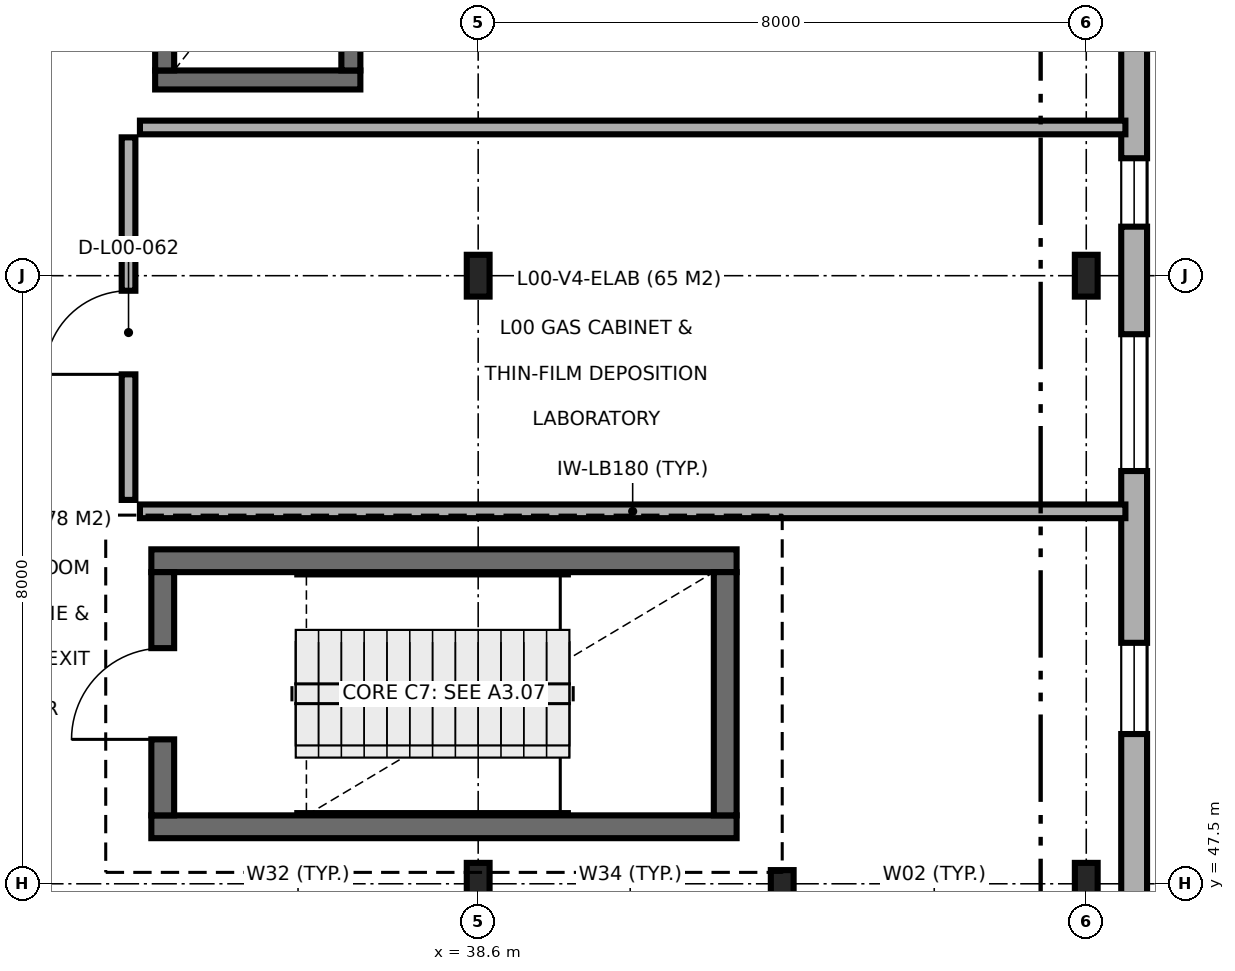
"""IFC4 building model, lengths in metres.
Left out: names, types, materials, properties, quantities, classifications, styles, units other than length and angle.
Written with IfcOpenShell. Run it as: python <this file> out.ifc"""

import sys

from ifc_helpers import new_model, si_unit, direction, frame, frame_2d, origin, origin_2d, place, context, subcontext, project, spatial, rectangle, i_section, extrude, element, fill, save


model = new_model("IFC4")
c1 = context("Model", 3, precision=1e-05, world=origin(), true_north=direction((0.0, 1.0)))
c2 = subcontext(c1, "Body", "Model", "MODEL_VIEW")
j1 = project(units=[si_unit("LENGTHUNIT", "METRE"), si_unit("PLANEANGLEUNIT", "RADIAN")], contexts=[c1])
p1 = place(None, origin())
s1 = spatial("IfcSite", under=j1, at=p1, CompositionType="ELEMENT")
p2 = place(p1, origin())
s2 = spatial("IfcBuilding", under=s1, at=p2, CompositionType="ELEMENT")
p3 = place(p2, origin())
s3 = spatial("IfcBuildingStorey", under=s2, at=p3, CompositionType="ELEMENT", Elevation=0.0)
for number, where, z_axis, x_axis in (
    (1, (38.6, 47.5, 0.0), (0.0, 0.0, 1.0), (1.0, 0.0, 0.0)),
    (2, (38.6, 55.5, 0.0), (0.0, 0.0, 1.0), (1.0, 0.0, 0.0)),
):
    element("IfcColumn", number, at=place(p3, frame(where, z_axis=z_axis, x_axis=x_axis)), inside=s3, PredefinedType="COLUMN", context=c2, shape_type="SweptSolid", body=[
        extrude(i_section(OverallWidth=0.3, OverallDepth=0.55, WebThickness=0.015, FlangeThickness=0.029, FilletRadius=0.027, at=origin_2d()), origin(), (0.0, 0.0, 1.0), 4.8),
    ])
p4 = place(p3, frame((42.6, 47.5, 0.0), z_axis=(0.0, 0.0, 1.0), x_axis=(1.0, 0.0, 0.0)))
e3 = element("IfcColumn", 3, at=p4, inside=s3, PredefinedType="COLUMN", context=c2, shape_type="SweptSolid", body=[
    extrude(i_section(OverallWidth=0.3, OverallDepth=0.36, WebThickness=0.012, FlangeThickness=0.022, FilletRadius=0.027, at=origin_2d()), origin(), (0.0, 0.0, 1.0), 4.8),
])
for number, where, z_axis, x_axis in (
    (4, (46.6, 47.5, 0.0), (0.0, 0.0, 1.0), (1.0, 0.0, 0.0)),
    (5, (46.6, 55.5, 0.0), (0.0, 0.0, 1.0), (1.0, 0.0, 0.0)),
):
    element("IfcColumn", number, at=place(p3, frame(where, z_axis=z_axis, x_axis=x_axis)), inside=s3, PredefinedType="COLUMN", context=c2, shape_type="SweptSolid", body=[
        extrude(i_section(OverallWidth=0.3, OverallDepth=0.55, WebThickness=0.015, FlangeThickness=0.029, FilletRadius=0.027, at=origin_2d()), origin(), (0.0, 0.0, 1.0), 4.8),
    ])
for number, where, z_axis, x_axis in (
    (6, (34.3, 48.25, 0.0), (0.0, 0.0, 1.0), (1.0, 0.0, 0.0)),
    (7, (42.0, 51.75, 0.0), (0.0, 0.0, 1.0), (-1.0, 0.0, 0.0)),
):
    element("IfcWall", number, at=place(p3, frame(where, z_axis=z_axis, x_axis=x_axis)), inside=s3, PredefinedType="SHEAR", context=c2, shape_type="SweptSolid", body=[
        extrude(rectangle(XDim=7.7, YDim=0.3, at=frame_2d((3.85, 0.0))), origin(), (0.0, 0.0, 1.0), 4.8),
    ])
p5 = place(p3, frame((34.45, 51.6, 0.0), z_axis=(0.0, 0.0, 1.0), x_axis=(0.0, -1.0, 0.0)))
e8 = element("IfcWall", 8, at=p5, inside=s3, PredefinedType="SHEAR", context=c2, shape_type="SweptSolid", body=[
    extrude(rectangle(XDim=3.2, YDim=0.3, at=frame_2d((1.6, 0.0))), origin(), (0.0, 0.0, 1.0), 4.8),
])
p6 = place(p5, frame((1.0, 0.0, 0.0)))
e9 = element("IfcOpeningElement", 9, at=p6, cuts=e8, PredefinedType="OPENING", context=c2, shape_type="SweptSolid", body=[
    extrude(rectangle(XDim=1.2, YDim=2.15, at=frame_2d((0.6, 1.075))), frame((0.0, 0.16, 0.0), z_axis=(0.0, -1.0, 0.0), x_axis=(1.0, 0.0, 0.0)), (0.0, 0.0, 1.0), 0.32),
])
p7 = place(p3, frame((41.85, 48.4, 0.0), z_axis=(0.0, 0.0, 1.0), x_axis=(0.0, 1.0, 0.0)))
e10 = element("IfcWall", 10, at=p7, inside=s3, PredefinedType="SHEAR", context=c2, shape_type="SweptSolid", body=[
    extrude(rectangle(XDim=3.2, YDim=0.3, at=frame_2d((1.6, 0.0))), origin(), (0.0, 0.0, 1.0), 4.8),
])
p8 = place(p3, frame((34.35, 58.075, 0.0), z_axis=(0.0, 0.0, 1.0), x_axis=(1.0, 0.0, 0.0)))
e11 = element("IfcWall", 11, at=p8, inside=s3, PredefinedType="SHEAR", context=c2, shape_type="SweptSolid", body=[
    extrude(rectangle(XDim=2.7, YDim=0.25, at=frame_2d((1.35, 0.0))), origin(), (0.0, 0.0, 1.0), 4.8),
])
p9 = place(p3, frame((34.475, 61.0, 0.0), z_axis=(0.0, 0.0, 1.0), x_axis=(0.0, -1.0, 0.0)))
e12 = element("IfcWall", 12, at=p9, inside=s3, PredefinedType="SHEAR", context=c2, shape_type="SweptSolid", body=[
    extrude(rectangle(XDim=2.8, YDim=0.25, at=frame_2d((1.4, 0.0))), origin(), (0.0, 0.0, 1.0), 4.8),
])
p10 = place(p9, frame((0.85, 0.0, 0.0)))
e13 = element("IfcOpeningElement", 13, at=p10, cuts=e12, PredefinedType="OPENING", context=c2, shape_type="SweptSolid", body=[
    extrude(rectangle(XDim=1.1, YDim=2.15, at=frame_2d((0.55, 1.075))), frame((0.0, 0.135, 0.0), z_axis=(0.0, -1.0, 0.0), x_axis=(1.0, 0.0, 0.0)), (0.0, 0.0, 1.0), 0.27),
])
p11 = place(p3, frame((36.925, 58.2, 0.0), z_axis=(0.0, 0.0, 1.0), x_axis=(0.0, 1.0, 0.0)))
e14 = element("IfcWall", 14, at=p11, inside=s3, PredefinedType="SHEAR", context=c2, shape_type="SweptSolid", body=[
    extrude(rectangle(XDim=2.8, YDim=0.25, at=frame_2d((1.4, 0.0))), origin(), (0.0, 0.0, 1.0), 4.8),
])
p12 = place(p3, frame((47.23, 47.222, 0.0), z_axis=(0.0, 0.0, 1.0), x_axis=(0.0, 1.0, 0.0)))
e15 = element("IfcWall", 15, at=p12, inside=s3, PredefinedType="SOLIDWALL", context=c2, shape_type="SweptSolid", body=[
    extrude(rectangle(XDim=27.278, YDim=0.34, at=frame_2d((13.639, 0.0))), origin(), (0.0, 0.0, 1.0), 4.55),
])
p13 = place(p12, frame((2.248, 0.0, 0.9)))
e16 = element("IfcOpeningElement", 16, at=p13, cuts=e15, PredefinedType="OPENING", context=c2, shape_type="SweptSolid", body=[
    extrude(rectangle(XDim=1.2, YDim=1.8, at=frame_2d((0.6, 0.9))), frame((0.0, 0.18, 0.0), z_axis=(0.0, -1.0, 0.0), x_axis=(1.0, 0.0, 0.0)), (0.0, 0.0, 1.0), 0.36),
])
p14 = place(p12, frame((5.708, 0.0, 0.9)))
e17 = element("IfcOpeningElement", 17, at=p14, cuts=e15, PredefinedType="OPENING", context=c2, shape_type="SweptSolid", body=[
    extrude(rectangle(XDim=1.8, YDim=1.8, at=frame_2d((0.9, 0.9))), frame((0.0, 0.18, 0.0), z_axis=(0.0, -1.0, 0.0), x_axis=(1.0, 0.0, 0.0)), (0.0, 0.0, 1.0), 0.36),
])
p15 = place(p12, frame((8.923, 0.0, 0.9)))
e18 = element("IfcOpeningElement", 18, at=p15, cuts=e15, PredefinedType="OPENING", context=c2, shape_type="SweptSolid", body=[
    extrude(rectangle(XDim=0.9, YDim=1.8, at=frame_2d((0.45, 0.9))), frame((0.0, 0.18, 0.0), z_axis=(0.0, -1.0, 0.0), x_axis=(1.0, 0.0, 0.0)), (0.0, 0.0, 1.0), 0.36),
])
p16 = place(p12, frame((14.758, 0.0, 0.9)))
e19 = element("IfcOpeningElement", 19, at=p16, cuts=e15, PredefinedType="OPENING", context=c2, shape_type="SweptSolid", body=[
    extrude(rectangle(XDim=0.9, YDim=1.8, at=frame_2d((0.45, 0.9))), frame((0.0, 0.18, 0.0), z_axis=(0.0, -1.0, 0.0), x_axis=(1.0, 0.0, 0.0)), (0.0, 0.0, 1.0), 0.36),
])
p17 = place(p12, frame((20.333, 0.0, 0.9)))
e20 = element("IfcOpeningElement", 20, at=p17, cuts=e15, PredefinedType="OPENING", context=c2, shape_type="SweptSolid", body=[
    extrude(rectangle(XDim=1.5, YDim=2.1, at=frame_2d((0.75, 1.05))), frame((0.0, 0.18, 0.0), z_axis=(0.0, -1.0, 0.0), x_axis=(1.0, 0.0, 0.0)), (0.0, 0.0, 1.0), 0.36),
])
p18 = place(p12, frame((25.128, 0.0, 0.9)))
e21 = element("IfcOpeningElement", 21, at=p18, cuts=e15, PredefinedType="OPENING", context=c2, shape_type="SweptSolid", body=[
    extrude(rectangle(XDim=1.2, YDim=1.8, at=frame_2d((0.6, 0.9))), frame((0.0, 0.18, 0.0), z_axis=(0.0, -1.0, 0.0), x_axis=(1.0, 0.0, 0.0)), (0.0, 0.0, 1.0), 0.36),
])
for number, where, z_axis, x_axis in (
    (22, (34.15, 52.4, 0.0), (0.0, 0.0, 1.0), (1.0, 0.0, 0.0)),
    (23, (34.15, 57.45, 0.0), (0.0, 0.0, 1.0), (1.0, 0.0, 0.0)),
):
    element("IfcWall", number, at=place(p3, frame(where, z_axis=z_axis, x_axis=x_axis)), inside=s3, PredefinedType="PARTITIONING", context=c2, shape_type="SweptSolid", body=[
        extrude(rectangle(XDim=12.965, YDim=0.18, at=frame_2d((6.482, 0.0))), origin(), (0.0, 0.0, 1.0), 4.55),
    ])
p19 = place(p3, frame((34.0, 52.55, 0.0), z_axis=(0.0, 0.0, 1.0), x_axis=(0.0, 1.0, 0.0)))
e24 = element("IfcWall", 24, at=p19, inside=s3, PredefinedType="PARTITIONING", context=c2, shape_type="SweptSolid", body=[
    extrude(rectangle(XDim=4.77, YDim=0.18, at=frame_2d((2.385, 0.0))), origin(), (0.0, 0.0, 1.0), 4.55),
])
p20 = place(p19, frame((1.652, 0.0, 0.0)))
e25 = element("IfcOpeningElement", 25, at=p20, cuts=e24, PredefinedType="OPENING", context=c2, shape_type="SweptSolid", body=[
    extrude(rectangle(XDim=1.1, YDim=2.15, at=frame_2d((0.55, 1.075))), frame((0.0, 0.1, 0.0), z_axis=(0.0, -1.0, 0.0), x_axis=(1.0, 0.0, 0.0)), (0.0, 0.0, 1.0), 0.2),
])
p21 = place(p6, frame((1.2, 0.0, 0.0), z_axis=(0.0, 0.0, 1.0), x_axis=(-1.0, 0.0, 0.0)))
e26 = element("IfcDoor", 26, at=p21, inside=s3, OperationType="SINGLE_SWING_RIGHT", PredefinedType="DOOR", context=c2, shape_type="SweptSolid", body=[
    extrude(rectangle(XDim=1.2, YDim=2.15, at=frame_2d((0.6, 1.075))), frame((0.0, 0.025, 0.0), z_axis=(0.0, -1.0, 0.0), x_axis=(1.0, 0.0, 0.0)), (0.0, 0.0, 1.0), 0.05),
])
fill(e9, e26)
p22 = place(p13, origin())
e27 = element("IfcWindow", 27, at=p22, inside=s3, PartitioningType="SINGLE_PANEL", PredefinedType="WINDOW", context=c2, shape_type="SweptSolid", body=[
    extrude(rectangle(XDim=1.2, YDim=1.8, at=frame_2d((0.6, 0.9))), frame((0.0, 0.03, 0.0), z_axis=(0.0, -1.0, 0.0), x_axis=(1.0, 0.0, 0.0)), (0.0, 0.0, 1.0), 0.06),
])
fill(e16, e27)
p23 = place(p14, origin())
e28 = element("IfcWindow", 28, at=p23, inside=s3, PartitioningType="SINGLE_PANEL", PredefinedType="WINDOW", context=c2, shape_type="SweptSolid", body=[
    extrude(rectangle(XDim=1.8, YDim=1.8, at=frame_2d((0.9, 0.9))), frame((0.0, 0.03, 0.0), z_axis=(0.0, -1.0, 0.0), x_axis=(1.0, 0.0, 0.0)), (0.0, 0.0, 1.0), 0.06),
])
fill(e17, e28)
p24 = place(p15, origin())
e29 = element("IfcWindow", 29, at=p24, inside=s3, PartitioningType="SINGLE_PANEL", PredefinedType="WINDOW", context=c2, shape_type="SweptSolid", body=[
    extrude(rectangle(XDim=0.9, YDim=1.8, at=frame_2d((0.45, 0.9))), frame((0.0, 0.03, 0.0), z_axis=(0.0, -1.0, 0.0), x_axis=(1.0, 0.0, 0.0)), (0.0, 0.0, 1.0), 0.06),
])
fill(e18, e29)
p25 = place(p20, origin())
e30 = element("IfcDoor", 30, at=p25, inside=s3, OperationType="SINGLE_SWING_LEFT", PredefinedType="DOOR", context=c2, shape_type="SweptSolid", body=[
    extrude(rectangle(XDim=1.1, YDim=2.15, at=frame_2d((0.55, 1.075))), frame((0.0, 0.025, 0.0), z_axis=(0.0, -1.0, 0.0), x_axis=(1.0, 0.0, 0.0)), (0.0, 0.0, 1.0), 0.05),
])
fill(e25, e30)
save(model, sys.argv[1])
